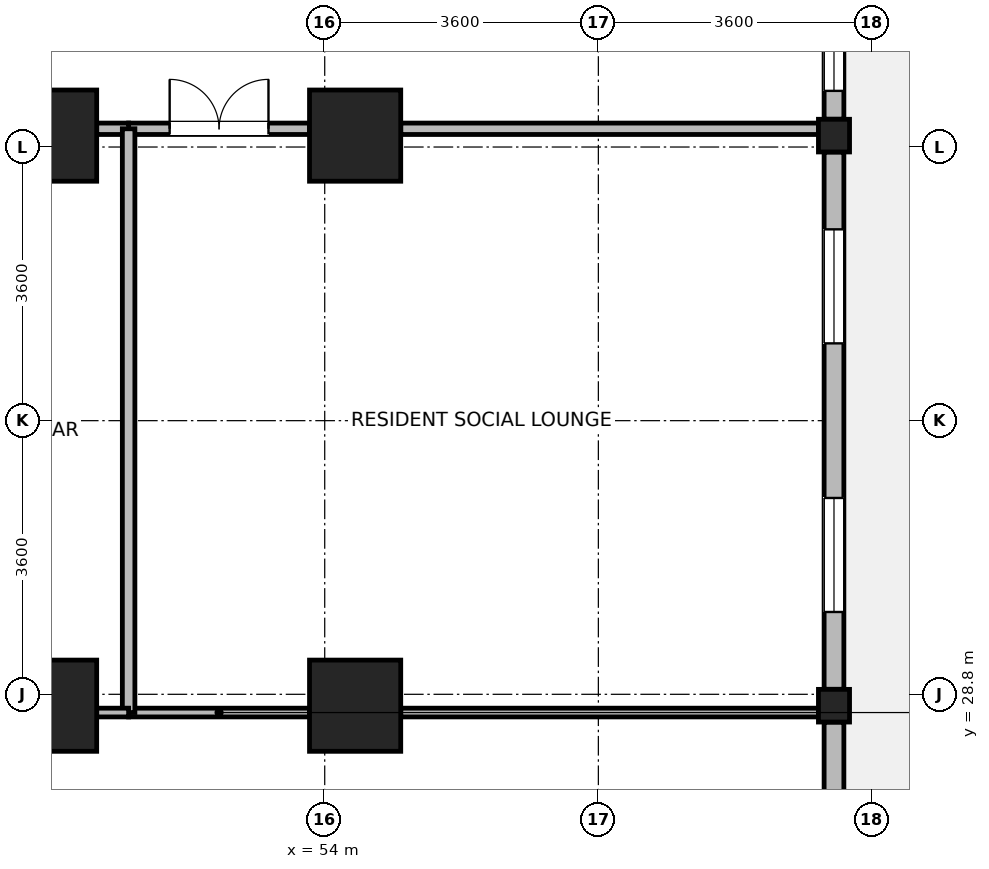
"""IFC4 building model, lengths in metres.
Left out: names, types, materials, properties, quantities, classifications, styles, units other than length and angle.
Written with IfcOpenShell. Run it as: python <this file> out.ifc"""

import sys

from ifc_helpers import new_model, si_unit, direction, frame, frame_2d, origin, origin_2d, place, context, subcontext, project, spatial, rectangle, i_section, extrude, source, transform, mapped, element, fill, save


model = new_model("IFC4")
c1 = context("Model", 3, precision=1e-05, world=origin(), true_north=direction((0.0, 1.0)))
c2 = subcontext(c1, "Body", "Model", "MODEL_VIEW")
j1 = project(units=[si_unit("LENGTHUNIT", "METRE"), si_unit("PLANEANGLEUNIT", "RADIAN")], contexts=[c1])
p1 = place(None, origin())
s1 = spatial("IfcSite", under=j1, at=p1, CompositionType="ELEMENT")
p2 = place(p1, origin())
s2 = spatial("IfcBuilding", under=s1, at=p2, CompositionType="ELEMENT")
p3 = place(p2, frame((0.0, 0.0, 108.2)))
s3 = spatial("IfcBuildingStorey", under=s2, at=p3, CompositionType="ELEMENT", Elevation=108.2)
m1 = source(origin(), c2, "Body", "SweptSolid", [
    extrude(rectangle(XDim=1.2, YDim=1.2, at=origin_2d()), origin(), (0.0, 0.0, 1.0), 3.7),
])
for number, where, z_axis, x_axis in (
    (1, (50.4, 28.65, 0.0), (0.0, 0.0, 1.0), (1.0, 0.0, 0.0)),
    (2, (50.4, 36.15, 0.0), (0.0, 0.0, 1.0), (1.0, 0.0, 0.0)),
    (3, (54.4, 28.65, 0.0), (0.0, 0.0, 1.0), (1.0, 0.0, 0.0)),
    (4, (54.4, 36.15, 0.0), (0.0, 0.0, 1.0), (1.0, 0.0, 0.0)),
):
    element("IfcColumn", number, at=place(p3, frame(where, z_axis=z_axis, x_axis=x_axis)), inside=s3, PredefinedType="COLUMN", context=c2, shape_type="MappedRepresentation", body=[
        mapped(m1, transform((0.0, 0.0, 0.0), x_axis=(1.0, 0.0, 0.0), y_axis=(0.0, 1.0, 0.0), z_axis=(0.0, 0.0, 1.0), scale=1.0)),
    ])
m2 = source(origin(), c2, "Body", "SweptSolid", [
    extrude(i_section(OverallWidth=0.409, OverallDepth=0.43, WebThickness=0.024, FlangeThickness=0.033, FilletRadius=0.015, at=origin_2d()), origin(), (0.0, 0.0, 1.0), 3.7),
])
for number, where, z_axis, x_axis in (
    (5, (60.7, 28.65, 0.0), (0.0, 0.0, 1.0), (1.0, 0.0, 0.0)),
    (6, (60.7, 36.15, 0.0), (0.0, 0.0, 1.0), (1.0, 0.0, 0.0)),
):
    element("IfcColumn", number, at=place(p3, frame(where, z_axis=z_axis, x_axis=x_axis)), inside=s3, PredefinedType="COLUMN", context=c2, shape_type="MappedRepresentation", body=[
        mapped(m2, transform((0.0, 0.0, 0.0), x_axis=(1.0, 0.0, 0.0), y_axis=(0.0, 1.0, 0.0), z_axis=(0.0, 0.0, 1.0), scale=1.0)),
    ])
p4 = place(p3, frame((60.7, 28.434, 0.0), z_axis=(0.0, 0.0, 1.0), x_axis=(0.0, -1.0, 0.0)))
e7 = element("IfcWall", 7, at=p4, inside=s3, PredefinedType="STANDARD", context=c2, shape_type="SweptSolid", body=[
    extrude(rectangle(XDim=6.618, YDim=0.26, at=frame_2d((3.309, 0.0))), origin(), (0.0, 0.0, 1.0), 2.98),
])
p5 = place(p4, frame((4.213, 0.0, 0.85)))
e8 = element("IfcOpeningElement", 8, at=p5, cuts=e7, PredefinedType="OPENING", context=c2, shape_type="SweptSolid", body=[
    extrude(rectangle(XDim=1.5, YDim=1.85, at=frame_2d((0.75, 0.925))), frame((0.0, 0.14, 0.0), z_axis=(0.0, -1.0, 0.0), x_axis=(1.0, 0.0, 0.0)), (0.0, 0.0, 1.0), 0.28),
])
p6 = place(p4, frame((2.834, 0.0, 0.85)))
e9 = element("IfcOpeningElement", 9, at=p6, cuts=e7, PredefinedType="OPENING", context=c2, shape_type="SweptSolid", body=[
    extrude(rectangle(XDim=0.95, YDim=1.75, at=frame_2d((0.475, 0.875))), frame((0.0, 0.14, 0.0), z_axis=(0.0, -1.0, 0.0), x_axis=(1.0, 0.0, 0.0)), (0.0, 0.0, 1.0), 0.28),
])
p7 = place(p3, frame((60.7, 35.934, 0.0), z_axis=(0.0, 0.0, 1.0), x_axis=(0.0, -1.0, 0.0)))
e10 = element("IfcWall", 10, at=p7, inside=s3, PredefinedType="STANDARD", context=c2, shape_type="SweptSolid", body=[
    extrude(rectangle(XDim=7.068, YDim=0.26, at=frame_2d((3.534, 0.0))), origin(), (0.0, 0.0, 1.0), 2.98),
])
p8 = place(p7, frame((1.017, 0.0, 0.85)))
e11 = element("IfcOpeningElement", 11, at=p8, cuts=e10, PredefinedType="OPENING", context=c2, shape_type="SweptSolid", body=[
    extrude(rectangle(XDim=1.5, YDim=1.85, at=frame_2d((0.75, 0.925))), frame((0.0, 0.14, 0.0), z_axis=(0.0, -1.0, 0.0), x_axis=(1.0, 0.0, 0.0)), (0.0, 0.0, 1.0), 0.28),
])
p9 = place(p7, frame((4.551, 0.0, 0.85)))
e12 = element("IfcOpeningElement", 12, at=p9, cuts=e10, PredefinedType="OPENING", context=c2, shape_type="SweptSolid", body=[
    extrude(rectangle(XDim=1.5, YDim=1.85, at=frame_2d((0.75, 0.925))), frame((0.0, 0.14, 0.0), z_axis=(0.0, -1.0, 0.0), x_axis=(1.0, 0.0, 0.0)), (0.0, 0.0, 1.0), 0.28),
])
p10 = place(p3, frame((60.7, 39.73, 0.0), z_axis=(0.0, 0.0, 1.0), x_axis=(0.0, -1.0, 0.0)))
e13 = element("IfcWall", 13, at=p10, inside=s3, PredefinedType="STANDARD", context=c2, shape_type="SweptSolid", body=[
    extrude(rectangle(XDim=3.364, YDim=0.26, at=frame_2d((1.682, 0.0))), origin(), (0.0, 0.0, 1.0), 3.43),
])
p11 = place(p10, frame((2.041, 0.0, 0.85)))
e14 = element("IfcOpeningElement", 14, at=p11, cuts=e13, PredefinedType="OPENING", context=c2, shape_type="SweptSolid", body=[
    extrude(rectangle(XDim=0.95, YDim=1.75, at=frame_2d((0.475, 0.875))), frame((0.0, 0.14, 0.0), z_axis=(0.0, -1.0, 0.0), x_axis=(1.0, 0.0, 0.0)), (0.0, 0.0, 1.0), 0.28),
])
p12 = place(p10, frame((0.265, 0.0, 0.85)))
e15 = element("IfcOpeningElement", 15, at=p12, cuts=e13, PredefinedType="OPENING", context=c2, shape_type="SweptSolid", body=[
    extrude(rectangle(XDim=0.95, YDim=1.75, at=frame_2d((0.475, 0.875))), frame((0.0, 0.14, 0.0), z_axis=(0.0, -1.0, 0.0), x_axis=(1.0, 0.0, 0.0)), (0.0, 0.0, 1.0), 0.28),
])
p13 = place(p3, frame((51.42, 36.24, 0.0), z_axis=(0.0, 0.0, 1.0), x_axis=(1.0, 0.0, 0.0)))
e16 = element("IfcWall", 16, at=p13, inside=s3, PredefinedType="PARTITIONING", context=c2, shape_type="SweptSolid", body=[
    extrude(rectangle(XDim=2.38, YDim=0.15, at=frame_2d((1.19, 0.0))), origin(), (0.0, 0.0, 1.0), 2.78),
])
p14 = place(p13, frame((0.54, 0.0, 0.0)))
e17 = element("IfcOpeningElement", 17, at=p14, cuts=e16, PredefinedType="OPENING", context=c2, shape_type="SweptSolid", body=[
    extrude(rectangle(XDim=1.3, YDim=2.12, at=frame_2d((0.65, 1.06))), frame((0.0, 0.085, 0.0), z_axis=(0.0, -1.0, 0.0), x_axis=(1.0, 0.0, 0.0)), (0.0, 0.0, 1.0), 0.17),
])
p15 = place(p3, frame((55.0, 36.24, 0.0), z_axis=(0.0, 0.0, 1.0), x_axis=(1.0, 0.0, 0.0)))
e18 = element("IfcWall", 18, at=p15, inside=s3, PredefinedType="PARTITIONING", context=c2, shape_type="SweptSolid", body=[
    extrude(rectangle(XDim=5.496, YDim=0.15, at=frame_2d((2.748, 0.0))), origin(), (0.0, 0.0, 1.0), 2.78),
])
p16 = place(p3, frame((51.0, 36.24, 0.0), z_axis=(0.0, 0.0, 1.0), x_axis=(1.0, 0.0, 0.0)))
e19 = element("IfcWall", 19, at=p16, inside=s3, PredefinedType="PARTITIONING", context=c2, shape_type="SweptSolid", body=[
    extrude(rectangle(XDim=0.42, YDim=0.15, at=frame_2d((0.21, 0.0))), origin(), (0.0, 0.0, 1.0), 2.78),
])
p17 = place(p3, frame((51.42, 28.56, 0.0), z_axis=(0.0, 0.0, 1.0), x_axis=(1.0, 0.0, 0.0)))
e20 = element("IfcWall", 20, at=p17, inside=s3, PredefinedType="PARTITIONING", context=c2, shape_type="SweptSolid", body=[
    extrude(rectangle(XDim=2.38, YDim=0.115, at=frame_2d((1.19, 0.0))), origin(), (0.0, 0.0, 1.0), 2.78),
])
p18 = place(p3, frame((55.0, 28.56, 0.0), z_axis=(0.0, 0.0, 1.0), x_axis=(1.0, 0.0, 0.0)))
e21 = element("IfcWall", 21, at=p18, inside=s3, PredefinedType="PARTITIONING", context=c2, shape_type="SweptSolid", body=[
    extrude(rectangle(XDim=5.496, YDim=0.115, at=frame_2d((2.748, 0.0))), origin(), (0.0, 0.0, 1.0), 2.78),
])
p19 = place(p3, frame((51.42, 28.56, 0.0), z_axis=(0.0, 0.0, 1.0), x_axis=(0.0, 1.0, 0.0)))
e22 = element("IfcWall", 22, at=p19, inside=s3, PredefinedType="PARTITIONING", context=c2, shape_type="SweptSolid", body=[
    extrude(rectangle(XDim=7.68, YDim=0.165, at=frame_2d((3.84, 0.0))), origin(), (0.0, 0.0, 1.0), 3.43),
])
p20 = place(p3, frame((51.0, 28.56, 0.0), z_axis=(0.0, 0.0, 1.0), x_axis=(1.0, 0.0, 0.0)))
e23 = element("IfcWall", 23, at=p20, inside=s3, PredefinedType="PARTITIONING", context=c2, shape_type="SweptSolid", body=[
    extrude(rectangle(XDim=0.42, YDim=0.115, at=frame_2d((0.21, 0.0))), origin(), (0.0, 0.0, 1.0), 2.78),
])
p21 = place(p8, origin())
e24 = element("IfcWindow", 24, at=p21, inside=s3, PartitioningType="SINGLE_PANEL", PredefinedType="WINDOW", context=c2, shape_type="SweptSolid", body=[
    extrude(rectangle(XDim=1.5, YDim=1.85, at=frame_2d((0.75, 0.925))), frame((0.0, 0.03, 0.0), z_axis=(0.0, -1.0, 0.0), x_axis=(1.0, 0.0, 0.0)), (0.0, 0.0, 1.0), 0.06),
])
fill(e11, e24)
p22 = place(p9, origin())
e25 = element("IfcWindow", 25, at=p22, inside=s3, PartitioningType="SINGLE_PANEL", PredefinedType="WINDOW", context=c2, shape_type="SweptSolid", body=[
    extrude(rectangle(XDim=1.5, YDim=1.85, at=frame_2d((0.75, 0.925))), frame((0.0, 0.03, 0.0), z_axis=(0.0, -1.0, 0.0), x_axis=(1.0, 0.0, 0.0)), (0.0, 0.0, 1.0), 0.06),
])
fill(e12, e25)
p23 = place(p11, origin())
e26 = element("IfcWindow", 26, at=p23, inside=s3, PartitioningType="SINGLE_PANEL", PredefinedType="WINDOW", context=c2, shape_type="SweptSolid", body=[
    extrude(rectangle(XDim=0.95, YDim=1.75, at=frame_2d((0.475, 0.875))), frame((0.0, 0.03, 0.0), z_axis=(0.0, -1.0, 0.0), x_axis=(1.0, 0.0, 0.0)), (0.0, 0.0, 1.0), 0.06),
])
fill(e14, e26)
p24 = place(p14, origin())
e27 = element("IfcDoor", 27, at=p24, inside=s3, OperationType="DOUBLE_DOOR_SINGLE_SWING", PredefinedType="DOOR", context=c2, shape_type="SweptSolid", body=[
    extrude(rectangle(XDim=1.3, YDim=2.12, at=frame_2d((0.65, 1.06))), frame((0.0, 0.025, 0.0), z_axis=(0.0, -1.0, 0.0), x_axis=(1.0, 0.0, 0.0)), (0.0, 0.0, 1.0), 0.05),
])
fill(e17, e27)
save(model, sys.argv[1])
